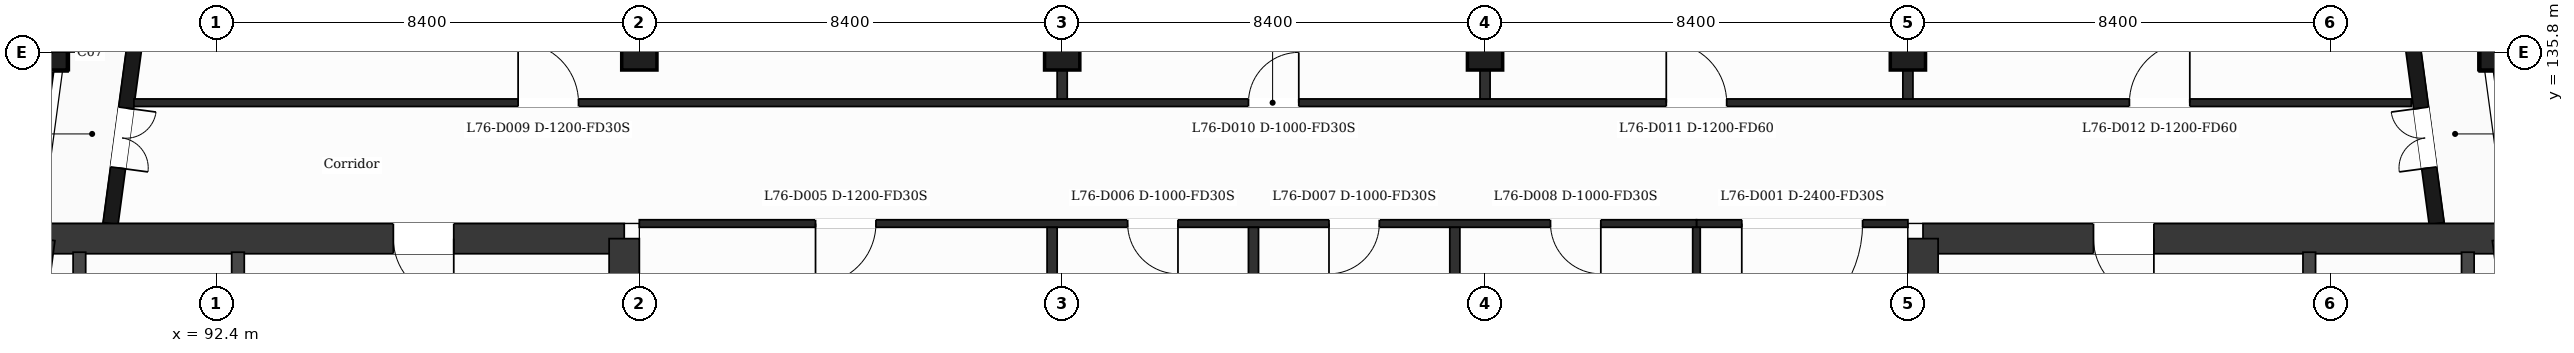
"""IFC4 building model, lengths in metres.
Left out: names, types, materials, properties, quantities, classifications, styles, units other than length and angle.
Written with IfcOpenShell. Run it as: python <this file> out.ifc"""

import sys

from ifc_helpers import new_model, si_unit, direction, frame, frame_2d, origin, origin_2d, place, context, subcontext, project, spatial, rectangle, extrude, element, fill, save


model = new_model("IFC4")
c1 = context("Model", 3, precision=1e-05, world=origin(), true_north=direction((0.0, 1.0)))
c2 = subcontext(c1, "Body", "Model", "MODEL_VIEW")
j1 = project(units=[si_unit("LENGTHUNIT", "METRE"), si_unit("PLANEANGLEUNIT", "RADIAN")], contexts=[c1])
p1 = place(None, origin())
s1 = spatial("IfcSite", under=j1, at=p1, CompositionType="ELEMENT")
p2 = place(p1, origin())
s2 = spatial("IfcBuilding", under=s1, at=p2, CompositionType="ELEMENT")
p3 = place(p2, frame((0.0, 0.0, 315.4)))
s3 = spatial("IfcBuildingStorey", under=s2, at=p3, CompositionType="ELEMENT", Elevation=315.4)
p4 = place(p3, frame((88.893, 132.1, 0.0), z_axis=(0.0, 0.0, 1.0), x_axis=(1.0, 0.0, 0.0)))
e1 = element("IfcWall", 1, at=p4, inside=s3, PredefinedType="SHEAR", context=c2, shape_type="SweptSolid", body=[
    extrude(rectangle(XDim=11.607, YDim=0.6, at=frame_2d((5.803, 0.0))), origin(), (0.0, 0.0, 1.0), 4.5),
])
p5 = place(p4, frame((7.021, 0.0, 0.0)))
e2 = element("IfcOpeningElement", 2, at=p5, cuts=e1, PredefinedType="OPENING", context=c2, shape_type="SweptSolid", body=[
    extrude(rectangle(XDim=1.2, YDim=2.1, at=frame_2d((0.6, 1.05))), frame((0.0, 0.31, 0.0), z_axis=(0.0, -1.0, 0.0), x_axis=(1.0, 0.0, 0.0)), (0.0, 0.0, 1.0), 0.62),
])
p6 = place(p3, frame((100.5, 132.1, 0.0), z_axis=(0.0, 0.0, 1.0), x_axis=(0.0, -1.0, 0.0)))
e3 = element("IfcWall", 3, at=p6, inside=s3, PredefinedType="SHEAR", context=c2, shape_type="SweptSolid", body=[
    extrude(rectangle(XDim=15.8, YDim=0.6, at=frame_2d((7.9, 0.0))), origin(), (0.0, 0.0, 1.0), 4.5),
])
p7 = place(p6, frame((7.95, 0.0, 0.0)))
e4 = element("IfcOpeningElement", 4, at=p7, cuts=e3, PredefinedType="OPENING", context=c2, shape_type="SweptSolid", body=[
    extrude(rectangle(XDim=1.4, YDim=2.1, at=frame_2d((0.7, 1.05))), frame((0.0, 0.31, 0.0), z_axis=(0.0, -1.0, 0.0), x_axis=(1.0, 0.0, 0.0)), (0.0, 0.0, 1.0), 0.62),
])
p8 = place(p3, frame((86.766, 116.3, 0.0), z_axis=(0.0, 0.0, 1.0), x_axis=(0.13341345841, 0.991060466932, 0.0)))
e5 = element("IfcWall", 5, at=p8, inside=s3, PredefinedType="SHEAR", context=c2, shape_type="SweptSolid", body=[
    extrude(rectangle(XDim=15.943, YDim=0.6, at=frame_2d((7.971, 0.0))), origin(), (0.0, 0.0, 1.0), 4.5),
])
p9 = place(p3, frame((126.3, 132.1, 0.0), z_axis=(0.0, 0.0, 1.0), x_axis=(1.0, 0.0, 0.0)))
e6 = element("IfcWall", 6, at=p9, inside=s3, PredefinedType="SHEAR", context=c2, shape_type="SweptSolid", body=[
    extrude(rectangle(XDim=11.607, YDim=0.6, at=frame_2d((5.803, 0.0))), origin(), (0.0, 0.0, 1.0), 4.5),
])
p10 = place(p9, frame((3.386, 0.0, 0.0)))
e7 = element("IfcOpeningElement", 7, at=p10, cuts=e6, PredefinedType="OPENING", context=c2, shape_type="SweptSolid", body=[
    extrude(rectangle(XDim=1.2, YDim=2.1, at=frame_2d((0.6, 1.05))), frame((0.0, 0.31, 0.0), z_axis=(0.0, -1.0, 0.0), x_axis=(1.0, 0.0, 0.0)), (0.0, 0.0, 1.0), 0.62),
])
p11 = place(p3, frame((137.907, 132.1, 0.0), z_axis=(0.0, 0.0, 1.0), x_axis=(0.13341345841, -0.991060466932, 0.0)))
e8 = element("IfcWall", 8, at=p11, inside=s3, PredefinedType="SHEAR", context=c2, shape_type="SweptSolid", body=[
    extrude(rectangle(XDim=15.943, YDim=0.6, at=frame_2d((7.971, 0.0))), origin(), (0.0, 0.0, 1.0), 4.5),
])
p12 = place(p3, frame((126.3, 116.3, 0.0), z_axis=(0.0, 0.0, 1.0), x_axis=(0.0, 1.0, 0.0)))
e9 = element("IfcWall", 9, at=p12, inside=s3, PredefinedType="SHEAR", context=c2, shape_type="SweptSolid", body=[
    extrude(rectangle(XDim=15.8, YDim=0.6, at=frame_2d((7.9, 0.0))), origin(), (0.0, 0.0, 1.0), 4.5),
])
p13 = place(p12, frame((6.45, 0.0, 0.0)))
e10 = element("IfcOpeningElement", 10, at=p13, cuts=e9, PredefinedType="OPENING", context=c2, shape_type="SweptSolid", body=[
    extrude(rectangle(XDim=1.4, YDim=2.1, at=frame_2d((0.7, 1.05))), frame((0.0, 0.31, 0.0), z_axis=(0.0, -1.0, 0.0), x_axis=(1.0, 0.0, 0.0)), (0.0, 0.0, 1.0), 0.62),
])
for number, where, z_axis, x_axis in (
    (11, (100.8, 135.8, 0.0), (0.0, 0.0, 1.0), (1.0, 0.0, 0.0)),
    (12, (109.2, 135.8, 0.0), (0.0, 0.0, 1.0), (1.0, 0.0, 0.0)),
    (13, (117.6, 135.8, 0.0), (0.0, 0.0, 1.0), (1.0, 0.0, 0.0)),
    (14, (126.0, 135.8, 0.0), (0.0, 0.0, 1.0), (1.0, 0.0, 0.0)),
    (15, (89.088, 135.8, 0.0), (0.0, 0.0, 1.0), (1.0, 0.0, 0.0)),
    (16, (137.711, 135.8, 0.0), (0.0, 0.0, 1.0), (1.0, 0.0, 0.0)),
):
    element("IfcColumn", number, at=place(p3, frame(where, z_axis=z_axis, x_axis=x_axis)), inside=s3, PredefinedType="COLUMN", context=c2, shape_type="SweptSolid", body=[
        extrude(rectangle(XDim=0.7, YDim=0.7, at=origin_2d()), origin(), (0.0, 0.0, 1.0), 4.5),
    ])
p14 = place(p3, frame((91.177, 138.95, 0.0), z_axis=(0.0, 0.0, 1.0), x_axis=(-0.133426664613, -0.991058689065, 0.0)))
e17 = element("IfcWall", 17, at=p14, inside=s3, PredefinedType="SOLIDWALL", context=c2, shape_type="SweptSolid", body=[
    extrude(rectangle(XDim=6.609, YDim=0.3, at=frame_2d((3.305, 0.0))), origin(), (0.0, 0.0, 1.0), 4.05),
])
p15 = place(p14, frame((1.039, 0.0, 0.9)))
e18 = element("IfcOpeningElement", 18, at=p15, cuts=e17, PredefinedType="OPENING", context=c2, shape_type="SweptSolid", body=[
    extrude(rectangle(XDim=1.2, YDim=2.1, at=frame_2d((0.6, 1.05))), frame((0.0, 0.16, 0.0), z_axis=(0.0, -1.0, 0.0), x_axis=(1.0, 0.0, 0.0)), (0.0, 0.0, 1.0), 0.32),
])
p16 = place(p14, frame((4.294, 0.0, 0.0)))
e19 = element("IfcOpeningElement", 19, at=p16, cuts=e17, PredefinedType="OPENING", context=c2, shape_type="SweptSolid", body=[
    extrude(rectangle(XDim=1.2, YDim=2.4, at=frame_2d((0.6, 1.2))), frame((0.0, 0.16, 0.0), z_axis=(0.0, -1.0, 0.0), x_axis=(1.0, 0.0, 0.0)), (0.0, 0.0, 1.0), 0.32),
])
p17 = place(p3, frame((136.504, 132.4, 0.0), z_axis=(0.0, 0.0, 1.0), x_axis=(-0.133399697462, 0.99106231929, 0.0)))
e20 = element("IfcWall", 20, at=p17, inside=s3, PredefinedType="SOLIDWALL", context=c2, shape_type="SweptSolid", body=[
    extrude(rectangle(XDim=6.74, YDim=0.3, at=frame_2d((3.37, 0.0))), origin(), (0.0, 0.0, 1.0), 4.05),
])
p18 = place(p17, frame((1.115, 0.0, 0.0)))
e21 = element("IfcOpeningElement", 21, at=p18, cuts=e20, PredefinedType="OPENING", context=c2, shape_type="SweptSolid", body=[
    extrude(rectangle(XDim=1.2, YDim=2.4, at=frame_2d((0.6, 1.2))), frame((0.0, 0.16, 0.0), z_axis=(0.0, -1.0, 0.0), x_axis=(1.0, 0.0, 0.0)), (0.0, 0.0, 1.0), 0.32),
])
p19 = place(p17, frame((3.835, 0.0, 0.9)))
e22 = element("IfcOpeningElement", 22, at=p19, cuts=e20, PredefinedType="OPENING", context=c2, shape_type="SweptSolid", body=[
    extrude(rectangle(XDim=2.4, YDim=2.1, at=frame_2d((1.2, 1.05))), frame((0.0, 0.16, 0.0), z_axis=(0.0, -1.0, 0.0), x_axis=(1.0, 0.0, 0.0)), (0.0, 0.0, 1.0), 0.32),
])
p20 = place(p3, frame((121.8, 132.4, 0.0), z_axis=(0.0, 0.0, 1.0), x_axis=(1.0, 0.0, 0.0)))
e23 = element("IfcWall", 23, at=p20, inside=s3, PredefinedType="PARTITIONING", context=c2, shape_type="SweptSolid", body=[
    extrude(rectangle(XDim=4.2, YDim=0.15, at=frame_2d((2.1, 0.0))), origin(), (0.0, 0.0, 1.0), 4.05),
])
p21 = place(p20, frame((0.9, 0.0, 0.0)))
e24 = element("IfcOpeningElement", 24, at=p21, cuts=e23, PredefinedType="OPENING", context=c2, shape_type="SweptSolid", body=[
    extrude(rectangle(XDim=2.4, YDim=2.1, at=frame_2d((1.2, 1.05))), frame((0.0, 0.085, 0.0), z_axis=(0.0, -1.0, 0.0), x_axis=(1.0, 0.0, 0.0)), (0.0, 0.0, 1.0), 0.17),
])
p22 = place(p3, frame((100.8, 132.4, 0.0), z_axis=(0.0, 0.0, 1.0), x_axis=(1.0, 0.0, 0.0)))
e25 = element("IfcWall", 25, at=p22, inside=s3, PredefinedType="PARTITIONING", context=c2, shape_type="SweptSolid", body=[
    extrude(rectangle(XDim=21.0, YDim=0.15, at=frame_2d((10.5, 0.0))), origin(), (0.0, 0.0, 1.0), 4.05),
])
p23 = place(p22, frame((3.5, 0.0, 0.0)))
e26 = element("IfcOpeningElement", 26, at=p23, cuts=e25, PredefinedType="OPENING", context=c2, shape_type="SweptSolid", body=[
    extrude(rectangle(XDim=1.2, YDim=2.1, at=frame_2d((0.6, 1.05))), frame((0.0, 0.085, 0.0), z_axis=(0.0, -1.0, 0.0), x_axis=(1.0, 0.0, 0.0)), (0.0, 0.0, 1.0), 0.17),
])
p24 = place(p22, frame((9.7, 0.0, 0.0)))
e27 = element("IfcOpeningElement", 27, at=p24, cuts=e25, PredefinedType="OPENING", context=c2, shape_type="SweptSolid", body=[
    extrude(rectangle(XDim=1.0, YDim=2.1, at=frame_2d((0.5, 1.05))), frame((0.0, 0.085, 0.0), z_axis=(0.0, -1.0, 0.0), x_axis=(1.0, 0.0, 0.0)), (0.0, 0.0, 1.0), 0.17),
])
p25 = place(p22, frame((13.7, 0.0, 0.0)))
e28 = element("IfcOpeningElement", 28, at=p25, cuts=e25, PredefinedType="OPENING", context=c2, shape_type="SweptSolid", body=[
    extrude(rectangle(XDim=1.0, YDim=2.1, at=frame_2d((0.5, 1.05))), frame((0.0, 0.085, 0.0), z_axis=(0.0, -1.0, 0.0), x_axis=(1.0, 0.0, 0.0)), (0.0, 0.0, 1.0), 0.17),
])
p26 = place(p22, frame((18.1, 0.0, 0.0)))
e29 = element("IfcOpeningElement", 29, at=p26, cuts=e25, PredefinedType="OPENING", context=c2, shape_type="SweptSolid", body=[
    extrude(rectangle(XDim=1.0, YDim=2.1, at=frame_2d((0.5, 1.05))), frame((0.0, 0.085, 0.0), z_axis=(0.0, -1.0, 0.0), x_axis=(1.0, 0.0, 0.0)), (0.0, 0.0, 1.0), 0.17),
])
p27 = place(p3, frame((90.76, 134.8, 0.0), z_axis=(0.0, 0.0, 1.0), x_axis=(1.0, 0.0, 0.0)))
e30 = element("IfcWall", 30, at=p27, inside=s3, PredefinedType="PARTITIONING", context=c2, shape_type="SweptSolid", body=[
    extrude(rectangle(XDim=45.24, YDim=0.15, at=frame_2d((22.62, 0.0))), origin(), (0.0, 0.0, 1.0), 4.05),
])
p28 = place(p27, frame((7.632, 0.0, 0.0)))
e31 = element("IfcOpeningElement", 31, at=p28, cuts=e30, PredefinedType="OPENING", context=c2, shape_type="SweptSolid", body=[
    extrude(rectangle(XDim=1.2, YDim=2.1, at=frame_2d((0.6, 1.05))), frame((0.0, 0.085, 0.0), z_axis=(0.0, -1.0, 0.0), x_axis=(1.0, 0.0, 0.0)), (0.0, 0.0, 1.0), 0.17),
])
p29 = place(p27, frame((22.14, 0.0, 0.0)))
e32 = element("IfcOpeningElement", 32, at=p29, cuts=e30, PredefinedType="OPENING", context=c2, shape_type="SweptSolid", body=[
    extrude(rectangle(XDim=1.0, YDim=2.1, at=frame_2d((0.5, 1.05))), frame((0.0, 0.085, 0.0), z_axis=(0.0, -1.0, 0.0), x_axis=(1.0, 0.0, 0.0)), (0.0, 0.0, 1.0), 0.17),
])
p30 = place(p27, frame((30.44, 0.0, 0.0)))
e33 = element("IfcOpeningElement", 33, at=p30, cuts=e30, PredefinedType="OPENING", context=c2, shape_type="SweptSolid", body=[
    extrude(rectangle(XDim=1.2, YDim=2.1, at=frame_2d((0.6, 1.05))), frame((0.0, 0.085, 0.0), z_axis=(0.0, -1.0, 0.0), x_axis=(1.0, 0.0, 0.0)), (0.0, 0.0, 1.0), 0.17),
])
p31 = place(p27, frame((39.64, 0.0, 0.0)))
e34 = element("IfcOpeningElement", 34, at=p31, cuts=e30, PredefinedType="OPENING", context=c2, shape_type="SweptSolid", body=[
    extrude(rectangle(XDim=1.2, YDim=2.1, at=frame_2d((0.6, 1.05))), frame((0.0, 0.085, 0.0), z_axis=(0.0, -1.0, 0.0), x_axis=(1.0, 0.0, 0.0)), (0.0, 0.0, 1.0), 0.17),
])
p32 = place(p3, frame((89.677, 124.575, 0.0), z_axis=(0.0, 0.0, 1.0), x_axis=(0.0, 1.0, 0.0)))
e35 = element("IfcWall", 35, at=p32, inside=s3, PredefinedType="PARTITIONING", context=c2, shape_type="SweptSolid", body=[
    extrude(rectangle(XDim=7.255, YDim=0.25, at=frame_2d((3.627, 0.0))), origin(), (0.0, 0.0, 1.0), 4.05),
])
p33 = place(p3, frame((92.827, 124.575, 0.0), z_axis=(0.0, 0.0, 1.0), x_axis=(0.0, 1.0, 0.0)))
e36 = element("IfcWall", 36, at=p33, inside=s3, PredefinedType="PARTITIONING", context=c2, shape_type="SweptSolid", body=[
    extrude(rectangle(XDim=7.255, YDim=0.25, at=frame_2d((3.627, 0.0))), origin(), (0.0, 0.0, 1.0), 4.05),
])
p34 = place(p33, frame((5.325, 0.0, 0.0)))
e37 = element("IfcOpeningElement", 37, at=p34, cuts=e36, PredefinedType="OPENING", context=c2, shape_type="SweptSolid", body=[
    extrude(rectangle(XDim=1.0, YDim=2.1, at=frame_2d((0.5, 1.05))), frame((0.0, 0.135, 0.0), z_axis=(0.0, -1.0, 0.0), x_axis=(1.0, 0.0, 0.0)), (0.0, 0.0, 1.0), 0.27),
])
p35 = place(p3, frame((109.0, 128.1, 0.0), z_axis=(0.0, 0.0, 1.0), x_axis=(0.0, 1.0, 0.0)))
e38 = element("IfcWall", 38, at=p35, inside=s3, PredefinedType="PARTITIONING", context=c2, shape_type="SweptSolid", body=[
    extrude(rectangle(XDim=4.225, YDim=0.2, at=frame_2d((2.112, 0.0))), origin(), (0.0, 0.0, 1.0), 4.05),
])
p36 = place(p3, frame((109.2, 134.875, 0.0), z_axis=(0.0, 0.0, 1.0), x_axis=(0.0, 1.0, 0.0)))
e39 = element("IfcWall", 39, at=p36, inside=s3, PredefinedType="PARTITIONING", context=c2, shape_type="SweptSolid", body=[
    extrude(rectangle(XDim=8.135, YDim=0.2, at=frame_2d((4.067, 0.0))), origin(), (0.0, 0.0, 1.0), 4.05),
])
for number, where, z_axis, x_axis in (
    (40, (113.0, 128.1, 0.0), (0.0, 0.0, 1.0), (0.0, 1.0, 0.0)),
    (41, (117.0, 128.1, 0.0), (0.0, 0.0, 1.0), (0.0, 1.0, 0.0)),
):
    element("IfcWall", number, at=place(p3, frame(where, z_axis=z_axis, x_axis=x_axis)), inside=s3, PredefinedType="PARTITIONING", context=c2, shape_type="SweptSolid", body=[
        extrude(rectangle(XDim=4.225, YDim=0.2, at=frame_2d((2.112, 0.0))), origin(), (0.0, 0.0, 1.0), 4.05),
    ])
p37 = place(p3, frame((117.6, 134.875, 0.0), z_axis=(0.0, 0.0, 1.0), x_axis=(0.0, 1.0, 0.0)))
e42 = element("IfcWall", 42, at=p37, inside=s3, PredefinedType="PARTITIONING", context=c2, shape_type="SweptSolid", body=[
    extrude(rectangle(XDim=8.135, YDim=0.2, at=frame_2d((4.067, 0.0))), origin(), (0.0, 0.0, 1.0), 4.05),
])
p38 = place(p3, frame((121.8, 121.075, 0.0), z_axis=(0.0, 0.0, 1.0), x_axis=(0.0, 1.0, 0.0)))
e43 = element("IfcWall", 43, at=p38, inside=s3, PredefinedType="PARTITIONING", context=c2, shape_type="SweptSolid", body=[
    extrude(rectangle(XDim=11.25, YDim=0.15, at=frame_2d((5.625, 0.0))), origin(), (0.0, 0.0, 1.0), 4.05),
])
p39 = place(p38, frame((2.825, 0.0, 0.0)))
e44 = element("IfcOpeningElement", 44, at=p39, cuts=e43, PredefinedType="OPENING", context=c2, shape_type="SweptSolid", body=[
    extrude(rectangle(XDim=1.2, YDim=2.1, at=frame_2d((0.6, 1.05))), frame((0.0, 0.085, 0.0), z_axis=(0.0, -1.0, 0.0), x_axis=(1.0, 0.0, 0.0)), (0.0, 0.0, 1.0), 0.17),
])
p40 = place(p3, frame((126.0, 134.875, 0.0), z_axis=(0.0, 0.0, 1.0), x_axis=(0.0, 1.0, 0.0)))
e45 = element("IfcWall", 45, at=p40, inside=s3, PredefinedType="PARTITIONING", context=c2, shape_type="SweptSolid", body=[
    extrude(rectangle(XDim=8.135, YDim=0.2, at=frame_2d((4.067, 0.0))), origin(), (0.0, 0.0, 1.0), 4.05),
])
p41 = place(p3, frame((133.973, 124.575, 0.0), z_axis=(0.0, 0.0, 1.0), x_axis=(0.0, 1.0, 0.0)))
e46 = element("IfcWall", 46, at=p41, inside=s3, PredefinedType="PARTITIONING", context=c2, shape_type="SweptSolid", body=[
    extrude(rectangle(XDim=7.255, YDim=0.25, at=frame_2d((3.627, 0.0))), origin(), (0.0, 0.0, 1.0), 4.05),
])
p42 = place(p41, frame((5.325, 0.0, 0.0)))
e47 = element("IfcOpeningElement", 47, at=p42, cuts=e46, PredefinedType="OPENING", context=c2, shape_type="SweptSolid", body=[
    extrude(rectangle(XDim=1.0, YDim=2.1, at=frame_2d((0.5, 1.05))), frame((0.0, 0.135, 0.0), z_axis=(0.0, -1.0, 0.0), x_axis=(1.0, 0.0, 0.0)), (0.0, 0.0, 1.0), 0.27),
])
p43 = place(p3, frame((137.123, 124.575, 0.0), z_axis=(0.0, 0.0, 1.0), x_axis=(0.0, 1.0, 0.0)))
e48 = element("IfcWall", 48, at=p43, inside=s3, PredefinedType="PARTITIONING", context=c2, shape_type="SweptSolid", body=[
    extrude(rectangle(XDim=7.255, YDim=0.25, at=frame_2d((3.627, 0.0))), origin(), (0.0, 0.0, 1.0), 4.05),
])
p44 = place(p16, origin())
e49 = element("IfcDoor", 49, at=p44, inside=s3, OperationType="DOUBLE_DOOR_SINGLE_SWING", PredefinedType="DOOR", context=c2, shape_type="SweptSolid", body=[
    extrude(rectangle(XDim=1.2, YDim=2.4, at=frame_2d((0.6, 1.2))), frame((0.0, 0.025, 0.0), z_axis=(0.0, -1.0, 0.0), x_axis=(1.0, 0.0, 0.0)), (0.0, 0.0, 1.0), 0.05),
])
fill(e19, e49)
p45 = place(p18, origin())
e50 = element("IfcDoor", 50, at=p45, inside=s3, OperationType="DOUBLE_DOOR_SINGLE_SWING", PredefinedType="DOOR", context=c2, shape_type="SweptSolid", body=[
    extrude(rectangle(XDim=1.2, YDim=2.4, at=frame_2d((0.6, 1.2))), frame((0.0, 0.025, 0.0), z_axis=(0.0, -1.0, 0.0), x_axis=(1.0, 0.0, 0.0)), (0.0, 0.0, 1.0), 0.05),
])
fill(e21, e50)
p46 = place(p21, origin())
e51 = element("IfcDoor", 51, at=p46, inside=s3, OperationType="SINGLE_SWING_LEFT", PredefinedType="DOOR", context=c2, shape_type="SweptSolid", body=[
    extrude(rectangle(XDim=2.4, YDim=2.1, at=frame_2d((1.2, 1.05))), frame((0.0, 0.025, 0.0), z_axis=(0.0, -1.0, 0.0), x_axis=(1.0, 0.0, 0.0)), (0.0, 0.0, 1.0), 0.05),
])
fill(e24, e51)
p47 = place(p23, origin())
e52 = element("IfcDoor", 52, at=p47, inside=s3, OperationType="SINGLE_SWING_LEFT", PredefinedType="DOOR", context=c2, shape_type="SweptSolid", body=[
    extrude(rectangle(XDim=1.2, YDim=2.1, at=frame_2d((0.6, 1.05))), frame((0.0, 0.025, 0.0), z_axis=(0.0, -1.0, 0.0), x_axis=(1.0, 0.0, 0.0)), (0.0, 0.0, 1.0), 0.05),
])
fill(e26, e52)
p48 = place(p24, origin())
e53 = element("IfcDoor", 53, at=p48, inside=s3, OperationType="SINGLE_SWING_RIGHT", PredefinedType="DOOR", context=c2, shape_type="SweptSolid", body=[
    extrude(rectangle(XDim=1.0, YDim=2.1, at=frame_2d((0.5, 1.05))), frame((0.0, 0.025, 0.0), z_axis=(0.0, -1.0, 0.0), x_axis=(1.0, 0.0, 0.0)), (0.0, 0.0, 1.0), 0.05),
])
fill(e27, e53)
p49 = place(p25, origin())
e54 = element("IfcDoor", 54, at=p49, inside=s3, OperationType="SINGLE_SWING_LEFT", PredefinedType="DOOR", context=c2, shape_type="SweptSolid", body=[
    extrude(rectangle(XDim=1.0, YDim=2.1, at=frame_2d((0.5, 1.05))), frame((0.0, 0.025, 0.0), z_axis=(0.0, -1.0, 0.0), x_axis=(1.0, 0.0, 0.0)), (0.0, 0.0, 1.0), 0.05),
])
fill(e28, e54)
p50 = place(p26, origin())
e55 = element("IfcDoor", 55, at=p50, inside=s3, OperationType="SINGLE_SWING_RIGHT", PredefinedType="DOOR", context=c2, shape_type="SweptSolid", body=[
    extrude(rectangle(XDim=1.0, YDim=2.1, at=frame_2d((0.5, 1.05))), frame((0.0, 0.025, 0.0), z_axis=(0.0, -1.0, 0.0), x_axis=(1.0, 0.0, 0.0)), (0.0, 0.0, 1.0), 0.05),
])
fill(e29, e55)
p51 = place(p28, origin())
e56 = element("IfcDoor", 56, at=p51, inside=s3, OperationType="SINGLE_SWING_LEFT", PredefinedType="DOOR", context=c2, shape_type="SweptSolid", body=[
    extrude(rectangle(XDim=1.2, YDim=2.1, at=frame_2d((0.6, 1.05))), frame((0.0, 0.025, 0.0), z_axis=(0.0, -1.0, 0.0), x_axis=(1.0, 0.0, 0.0)), (0.0, 0.0, 1.0), 0.05),
])
fill(e31, e56)
p52 = place(p29, origin())
e57 = element("IfcDoor", 57, at=p52, inside=s3, OperationType="SINGLE_SWING_RIGHT", PredefinedType="DOOR", context=c2, shape_type="SweptSolid", body=[
    extrude(rectangle(XDim=1.0, YDim=2.1, at=frame_2d((0.5, 1.05))), frame((0.0, 0.025, 0.0), z_axis=(0.0, -1.0, 0.0), x_axis=(1.0, 0.0, 0.0)), (0.0, 0.0, 1.0), 0.05),
])
fill(e32, e57)
p53 = place(p30, origin())
e58 = element("IfcDoor", 58, at=p53, inside=s3, OperationType="SINGLE_SWING_LEFT", PredefinedType="DOOR", context=c2, shape_type="SweptSolid", body=[
    extrude(rectangle(XDim=1.2, YDim=2.1, at=frame_2d((0.6, 1.05))), frame((0.0, 0.025, 0.0), z_axis=(0.0, -1.0, 0.0), x_axis=(1.0, 0.0, 0.0)), (0.0, 0.0, 1.0), 0.05),
])
fill(e33, e58)
p54 = place(p31, origin())
e59 = element("IfcDoor", 59, at=p54, inside=s3, OperationType="SINGLE_SWING_RIGHT", PredefinedType="DOOR", context=c2, shape_type="SweptSolid", body=[
    extrude(rectangle(XDim=1.2, YDim=2.1, at=frame_2d((0.6, 1.05))), frame((0.0, 0.025, 0.0), z_axis=(0.0, -1.0, 0.0), x_axis=(1.0, 0.0, 0.0)), (0.0, 0.0, 1.0), 0.05),
])
fill(e34, e59)
p55 = place(p5, origin())
e60 = element("IfcDoor", 60, at=p55, inside=s3, OperationType="SINGLE_SWING_RIGHT", PredefinedType="DOOR", context=c2, shape_type="SweptSolid", body=[
    extrude(rectangle(XDim=1.2, YDim=2.1, at=frame_2d((0.6, 1.05))), frame((0.0, 0.025, 0.0), z_axis=(0.0, -1.0, 0.0), x_axis=(1.0, 0.0, 0.0)), (0.0, 0.0, 1.0), 0.05),
])
fill(e2, e60)
p56 = place(p10, origin())
e61 = element("IfcDoor", 61, at=p56, inside=s3, OperationType="SINGLE_SWING_RIGHT", PredefinedType="DOOR", context=c2, shape_type="SweptSolid", body=[
    extrude(rectangle(XDim=1.2, YDim=2.1, at=frame_2d((0.6, 1.05))), frame((0.0, 0.025, 0.0), z_axis=(0.0, -1.0, 0.0), x_axis=(1.0, 0.0, 0.0)), (0.0, 0.0, 1.0), 0.05),
])
fill(e7, e61)
save(model, sys.argv[1])
